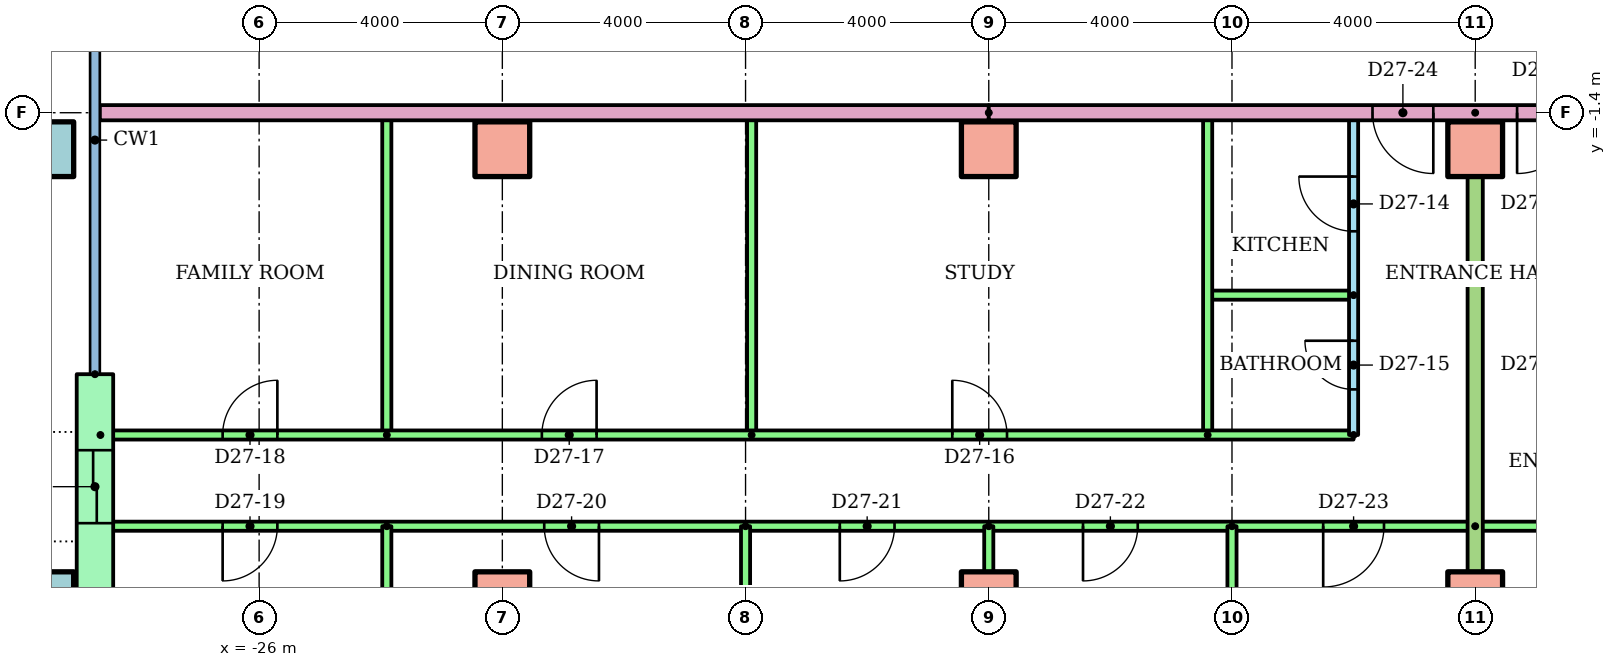
"""IFC4 building model, lengths in metres.
Left out: names, types, materials, properties, quantities, classifications, styles, units other than length and angle.
Written with IfcOpenShell. Run it as: python <this file> out.ifc"""

import sys

from ifc_helpers import new_model, si_unit, direction, frame, frame_2d, origin, origin_2d, place, context, subcontext, project, spatial, rectangle, hollow_rectangle, extrude, element, fill, save


model = new_model("IFC4")
c1 = context("Model", 3, precision=1e-05, world=origin(), true_north=direction((0.0, 1.0)))
c2 = subcontext(c1, "Body", "Model", "MODEL_VIEW")
j1 = project(units=[si_unit("LENGTHUNIT", "METRE"), si_unit("PLANEANGLEUNIT", "RADIAN")], contexts=[c1])
p1 = place(None, origin())
s1 = spatial("IfcSite", under=j1, at=p1, CompositionType="ELEMENT")
p2 = place(p1, origin())
s2 = spatial("IfcBuilding", under=s1, at=p2, CompositionType="ELEMENT")
p3 = place(p2, frame((0.0, 0.0, 103.1)))
s3 = spatial("IfcBuildingStorey", under=s2, at=p3, CompositionType="ELEMENT", Elevation=103.1)
p4 = place(p3, frame((-29.5, -9.4, 0.0)))
e1 = element("IfcColumn", 1, at=p4, inside=s3, PredefinedType="COLUMN", context=c2, shape_type="SweptSolid", body=[
    extrude(hollow_rectangle(XDim=0.9, YDim=0.9, WallThickness=0.045, at=origin_2d()), origin(), (0.0, 0.0, 1.0), 3.2),
])
for number, where in (
    (2, (-22.0, -9.4, 0.0)),
    (3, (-14.0, -9.4, 0.0)),
    (4, (-6.0, -9.4, 0.0)),
):
    element("IfcColumn", number, at=place(p3, frame(where)), inside=s3, PredefinedType="COLUMN", context=c2, shape_type="SweptSolid", body=[
        extrude(rectangle(XDim=0.9, YDim=0.9, at=origin_2d()), origin(), (0.0, 0.0, 1.0), 3.2),
    ])
p5 = place(p3, frame((-29.5, -2.0, 0.0)))
e5 = element("IfcColumn", 5, at=p5, inside=s3, PredefinedType="COLUMN", context=c2, shape_type="SweptSolid", body=[
    extrude(hollow_rectangle(XDim=0.9, YDim=0.9, WallThickness=0.045, at=origin_2d()), origin(), (0.0, 0.0, 1.0), 3.2),
])
for number, where in (
    (6, (-22.0, -2.0, 0.0)),
    (7, (-14.0, -2.0, 0.0)),
    (8, (-6.0, -2.0, 0.0)),
):
    element("IfcColumn", number, at=place(p3, frame(where)), inside=s3, PredefinedType="COLUMN", context=c2, shape_type="SweptSolid", body=[
        extrude(rectangle(XDim=0.9, YDim=0.9, at=origin_2d()), origin(), (0.0, 0.0, 1.0), 3.2),
    ])
p6 = place(p3, frame((-28.7, -5.7, 0.0), z_axis=(0.0, 0.0, 1.0), x_axis=(0.0, -1.0, 0.0)))
e9 = element("IfcWall", 9, at=p6, inside=s3, PredefinedType="STANDARD", context=c2, shape_type="SweptSolid", body=[
    extrude(rectangle(XDim=3.7, YDim=0.6, at=frame_2d((1.85, 0.0))), origin(), (0.0, 0.0, 1.0), 2.8),
])
p7 = place(p6, frame((1.25, 0.0, 0.0)))
e10 = element("IfcOpeningElement", 10, at=p7, cuts=e9, PredefinedType="OPENING", context=c2, shape_type="SweptSolid", body=[
    extrude(rectangle(XDim=1.2, YDim=2.1, at=frame_2d((0.6, 1.05))), frame((0.0, 0.31, 0.0), z_axis=(0.0, -1.0, 0.0), x_axis=(1.0, 0.0, 0.0)), (0.0, 0.0, 1.0), 0.62),
])
p8 = place(p3, frame((-8.0, -6.7, 0.0), z_axis=(0.0, 0.0, 1.0), x_axis=(0.0, 1.0, 0.0)))
e11 = element("IfcWall", 11, at=p8, inside=s3, PredefinedType="PARTITIONING", context=c2, shape_type="SweptSolid", body=[
    extrude(rectangle(XDim=5.3, YDim=0.15, at=frame_2d((2.65, 0.0))), origin(), (0.0, 0.0, 1.0), 2.4),
])
p9 = place(p8, frame((3.35, 0.0, 0.0)))
e12 = element("IfcOpeningElement", 12, at=p9, cuts=e11, PredefinedType="OPENING", context=c2, shape_type="SweptSolid", body=[
    extrude(rectangle(XDim=0.9, YDim=2.1, at=frame_2d((0.45, 1.05))), frame((0.0, 0.085, 0.0), z_axis=(0.0, -1.0, 0.0), x_axis=(1.0, 0.0, 0.0)), (0.0, 0.0, 1.0), 0.17),
])
p10 = place(p8, frame((0.75, 0.0, 0.0)))
e13 = element("IfcOpeningElement", 13, at=p10, cuts=e11, PredefinedType="OPENING", context=c2, shape_type="SweptSolid", body=[
    extrude(rectangle(XDim=0.8, YDim=2.1, at=frame_2d((0.4, 1.05))), frame((0.0, 0.085, 0.0), z_axis=(0.0, -1.0, 0.0), x_axis=(1.0, 0.0, 0.0)), (0.0, 0.0, 1.0), 0.17),
])
p11 = place(p3, frame((-8.0, -4.4, 0.0), z_axis=(0.0, 0.0, 1.0), x_axis=(-1.0, 0.0, 0.0)))
e14 = element("IfcWall", 14, at=p11, inside=s3, PredefinedType="PARTITIONING", context=c2, shape_type="SweptSolid", body=[
    extrude(rectangle(XDim=2.4, YDim=0.15, at=frame_2d((1.2, 0.0))), origin(), (0.0, 0.0, 1.0), 2.4),
])
for number, where, z_axis, x_axis in (
    (15, (-10.4, -6.7, 0.0), (0.0, 0.0, 1.0), (0.0, 1.0, 0.0)),
    (16, (-17.9, -6.7, 0.0), (0.0, 0.0, 1.0), (0.0, 1.0, 0.0)),
    (17, (-23.9, -6.7, 0.0), (0.0, 0.0, 1.0), (0.0, 1.0, 0.0)),
):
    element("IfcWall", number, at=place(p3, frame(where, z_axis=z_axis, x_axis=x_axis)), inside=s3, PredefinedType="PARTITIONING", context=c2, shape_type="SweptSolid", body=[
        extrude(rectangle(XDim=5.3, YDim=0.15, at=frame_2d((2.65, 0.0))), origin(), (0.0, 0.0, 1.0), 2.4),
    ])
p12 = place(p3, frame((-28.61, -6.7, 0.0)))
e18 = element("IfcWall", 18, at=p12, inside=s3, PredefinedType="PARTITIONING", context=c2, shape_type="SweptSolid", body=[
    extrude(rectangle(XDim=20.61, YDim=0.15, at=frame_2d((10.305, 0.0))), origin(), (0.0, 0.0, 1.0), 2.4),
])
p13 = place(p12, frame((14.01, 0.0, 0.0)))
e19 = element("IfcOpeningElement", 19, at=p13, cuts=e18, PredefinedType="OPENING", context=c2, shape_type="SweptSolid", body=[
    extrude(rectangle(XDim=0.9, YDim=2.1, at=frame_2d((0.45, 1.05))), frame((0.0, 0.085, 0.0), z_axis=(0.0, -1.0, 0.0), x_axis=(1.0, 0.0, 0.0)), (0.0, 0.0, 1.0), 0.17),
])
p14 = place(p12, frame((7.26, 0.0, 0.0)))
e20 = element("IfcOpeningElement", 20, at=p14, cuts=e18, PredefinedType="OPENING", context=c2, shape_type="SweptSolid", body=[
    extrude(rectangle(XDim=0.9, YDim=2.1, at=frame_2d((0.45, 1.05))), frame((0.0, 0.085, 0.0), z_axis=(0.0, -1.0, 0.0), x_axis=(1.0, 0.0, 0.0)), (0.0, 0.0, 1.0), 0.17),
])
p15 = place(p12, frame((2.01, 0.0, 0.0)))
e21 = element("IfcOpeningElement", 21, at=p15, cuts=e18, PredefinedType="OPENING", context=c2, shape_type="SweptSolid", body=[
    extrude(rectangle(XDim=0.9, YDim=2.1, at=frame_2d((0.45, 1.05))), frame((0.0, 0.085, 0.0), z_axis=(0.0, -1.0, 0.0), x_axis=(1.0, 0.0, 0.0)), (0.0, 0.0, 1.0), 0.17),
])
p16 = place(p3, frame((-6.0, -8.2, 0.0), z_axis=(0.0, 0.0, 1.0), x_axis=(-1.0, 0.0, 0.0)))
e22 = element("IfcWall", 22, at=p16, inside=s3, PredefinedType="PARTITIONING", context=c2, shape_type="SweptSolid", body=[
    extrude(rectangle(XDim=22.61, YDim=0.15, at=frame_2d((11.305, 0.0))), origin(), (0.0, 0.0, 1.0), 2.4),
])
p17 = place(p16, frame((19.7, 0.0, 0.0)))
e23 = element("IfcOpeningElement", 23, at=p17, cuts=e22, PredefinedType="OPENING", context=c2, shape_type="SweptSolid", body=[
    extrude(rectangle(XDim=0.9, YDim=2.1, at=frame_2d((0.45, 1.05))), frame((0.0, 0.085, 0.0), z_axis=(0.0, -1.0, 0.0), x_axis=(1.0, 0.0, 0.0)), (0.0, 0.0, 1.0), 0.17),
])
p18 = place(p16, frame((14.411, 0.0, 0.0)))
e24 = element("IfcOpeningElement", 24, at=p18, cuts=e22, PredefinedType="OPENING", context=c2, shape_type="SweptSolid", body=[
    extrude(rectangle(XDim=0.9, YDim=2.1, at=frame_2d((0.45, 1.05))), frame((0.0, 0.085, 0.0), z_axis=(0.0, -1.0, 0.0), x_axis=(1.0, 0.0, 0.0)), (0.0, 0.0, 1.0), 0.17),
])
p19 = place(p16, frame((9.55, 0.0, 0.0)))
e25 = element("IfcOpeningElement", 25, at=p19, cuts=e22, PredefinedType="OPENING", context=c2, shape_type="SweptSolid", body=[
    extrude(rectangle(XDim=0.9, YDim=2.1, at=frame_2d((0.45, 1.05))), frame((0.0, 0.085, 0.0), z_axis=(0.0, -1.0, 0.0), x_axis=(1.0, 0.0, 0.0)), (0.0, 0.0, 1.0), 0.17),
])
p20 = place(p16, frame((5.55, 0.0, 0.0)))
e26 = element("IfcOpeningElement", 26, at=p20, cuts=e22, PredefinedType="OPENING", context=c2, shape_type="SweptSolid", body=[
    extrude(rectangle(XDim=0.9, YDim=2.1, at=frame_2d((0.45, 1.05))), frame((0.0, 0.085, 0.0), z_axis=(0.0, -1.0, 0.0), x_axis=(1.0, 0.0, 0.0)), (0.0, 0.0, 1.0), 0.17),
])
p21 = place(p16, frame((1.5, 0.0, 0.0)))
e27 = element("IfcOpeningElement", 27, at=p21, cuts=e22, PredefinedType="OPENING", context=c2, shape_type="SweptSolid", body=[
    extrude(rectangle(XDim=1.0, YDim=2.1, at=frame_2d((0.5, 1.05))), frame((0.0, 0.085, 0.0), z_axis=(0.0, -1.0, 0.0), x_axis=(1.0, 0.0, 0.0)), (0.0, 0.0, 1.0), 0.17),
])
p22 = place(p3, frame((-23.9, -8.2, 0.0), z_axis=(0.0, 0.0, 1.0), x_axis=(0.0, -1.0, 0.0)))
e28 = element("IfcWall", 28, at=p22, inside=s3, PredefinedType="PARTITIONING", context=c2, shape_type="SweptSolid", body=[
    extrude(rectangle(XDim=6.22, YDim=0.15, at=frame_2d((3.11, 0.0))), origin(), (0.0, 0.0, 1.0), 2.4),
])
p23 = place(p3, frame((-18.0, -8.2, 0.0), z_axis=(0.0, 0.0, 1.0), x_axis=(0.0, -1.0, 0.0)))
e29 = element("IfcWall", 29, at=p23, inside=s3, PredefinedType="PARTITIONING", context=c2, shape_type="SweptSolid", body=[
    extrude(rectangle(XDim=8.021, YDim=0.15, at=frame_2d((4.01, 0.0))), origin(), (0.0, 0.0, 1.0), 2.4),
])
p24 = place(p3, frame((-14.0, -8.2, 0.0), z_axis=(0.0, 0.0, 1.0), x_axis=(0.0, -1.0, 0.0)))
e30 = element("IfcWall", 30, at=p24, inside=s3, PredefinedType="PARTITIONING", context=c2, shape_type="SweptSolid", body=[
    extrude(rectangle(XDim=8.01, YDim=0.15, at=frame_2d((4.005, 0.0))), origin(), (0.0, 0.0, 1.0), 2.4),
])
p25 = place(p3, frame((-10.0, -8.2, 0.0), z_axis=(0.0, 0.0, 1.0), x_axis=(0.0, -1.0, 0.0)))
e31 = element("IfcWall", 31, at=p25, inside=s3, PredefinedType="PARTITIONING", context=c2, shape_type="SweptSolid", body=[
    extrude(rectangle(XDim=8.021, YDim=0.15, at=frame_2d((4.01, 0.0))), origin(), (0.0, 0.0, 1.0), 2.4),
])
p26 = place(p3, frame((18.0, -8.2, 0.0), z_axis=(0.0, 0.0, 1.0), x_axis=(-1.0, 0.0, 0.0)))
e32 = element("IfcWall", 32, at=p26, inside=s3, PredefinedType="PARTITIONING", context=c2, shape_type="SweptSolid", body=[
    extrude(rectangle(XDim=24.0, YDim=0.15, at=frame_2d((12.0, 0.0))), origin(), (0.0, 0.0, 1.0), 2.4),
])
p27 = place(p26, frame((21.55, 0.0, 0.0)))
e33 = element("IfcOpeningElement", 33, at=p27, cuts=e32, PredefinedType="OPENING", context=c2, shape_type="SweptSolid", body=[
    extrude(rectangle(XDim=0.9, YDim=2.1, at=frame_2d((0.45, 1.05))), frame((0.0, 0.085, 0.0), z_axis=(0.0, -1.0, 0.0), x_axis=(1.0, 0.0, 0.0)), (0.0, 0.0, 1.0), 0.17),
])
p28 = place(p26, frame((17.55, 0.0, 0.0)))
e34 = element("IfcOpeningElement", 34, at=p28, cuts=e32, PredefinedType="OPENING", context=c2, shape_type="SweptSolid", body=[
    extrude(rectangle(XDim=0.9, YDim=2.1, at=frame_2d((0.45, 1.05))), frame((0.0, 0.085, 0.0), z_axis=(0.0, -1.0, 0.0), x_axis=(1.0, 0.0, 0.0)), (0.0, 0.0, 1.0), 0.17),
])
p29 = place(p26, frame((13.55, 0.0, 0.0)))
e35 = element("IfcOpeningElement", 35, at=p29, cuts=e32, PredefinedType="OPENING", context=c2, shape_type="SweptSolid", body=[
    extrude(rectangle(XDim=0.9, YDim=2.1, at=frame_2d((0.45, 1.05))), frame((0.0, 0.085, 0.0), z_axis=(0.0, -1.0, 0.0), x_axis=(1.0, 0.0, 0.0)), (0.0, 0.0, 1.0), 0.17),
])
p30 = place(p26, frame((9.55, 0.0, 0.0)))
e36 = element("IfcOpeningElement", 36, at=p30, cuts=e32, PredefinedType="OPENING", context=c2, shape_type="SweptSolid", body=[
    extrude(rectangle(XDim=0.9, YDim=2.1, at=frame_2d((0.45, 1.05))), frame((0.0, 0.085, 0.0), z_axis=(0.0, -1.0, 0.0), x_axis=(1.0, 0.0, 0.0)), (0.0, 0.0, 1.0), 0.17),
])
p31 = place(p26, frame((3.5, 0.0, 0.0)))
e37 = element("IfcOpeningElement", 37, at=p31, cuts=e32, PredefinedType="OPENING", context=c2, shape_type="SweptSolid", body=[
    extrude(rectangle(XDim=1.0, YDim=2.1, at=frame_2d((0.5, 1.05))), frame((0.0, 0.085, 0.0), z_axis=(0.0, -1.0, 0.0), x_axis=(1.0, 0.0, 0.0)), (0.0, 0.0, 1.0), 0.17),
])
p32 = place(p3, frame((-6.0, -1.4, 0.0), z_axis=(0.0, 0.0, 1.0), x_axis=(0.0, -1.0, 0.0)))
e38 = element("IfcWall", 38, at=p32, inside=s3, PredefinedType="PARTITIONING", context=c2, shape_type="SweptSolid", body=[
    extrude(rectangle(XDim=14.81, YDim=0.25, at=frame_2d((7.405, 0.0))), origin(), (0.0, 0.0, 1.0), 2.4),
])
p33 = place(p3, frame((-14.0, -1.4, 0.0), z_axis=(0.0, 0.0, 1.0), x_axis=(-1.0, 0.0, 0.0)))
e39 = element("IfcWall", 39, at=p33, inside=s3, PredefinedType="PARTITIONING", context=c2, shape_type="SweptSolid", body=[
    extrude(rectangle(XDim=14.62, YDim=0.25, at=frame_2d((7.31, 0.0))), origin(), (0.0, 0.0, 1.0), 2.4),
])
p34 = place(p3, frame((14.0, -1.4, 0.0), z_axis=(0.0, 0.0, 1.0), x_axis=(-1.0, 0.0, 0.0)))
e40 = element("IfcWall", 40, at=p34, inside=s3, PredefinedType="PARTITIONING", context=c2, shape_type="SweptSolid", body=[
    extrude(rectangle(XDim=28.0, YDim=0.25, at=frame_2d((14.0, 0.0))), origin(), (0.0, 0.0, 1.0), 2.4),
])
p35 = place(p34, frame((20.689, 0.0, 0.0)))
e41 = element("IfcOpeningElement", 41, at=p35, cuts=e40, PredefinedType="OPENING", context=c2, shape_type="SweptSolid", body=[
    extrude(rectangle(XDim=1.0, YDim=2.1, at=frame_2d((0.5, 1.05))), frame((0.0, 0.135, 0.0), z_axis=(0.0, -1.0, 0.0), x_axis=(1.0, 0.0, 0.0)), (0.0, 0.0, 1.0), 0.27),
])
p36 = place(p34, frame((18.311, 0.0, 0.0)))
e42 = element("IfcOpeningElement", 42, at=p36, cuts=e40, PredefinedType="OPENING", context=c2, shape_type="SweptSolid", body=[
    extrude(rectangle(XDim=1.0, YDim=2.1, at=frame_2d((0.5, 1.05))), frame((0.0, 0.135, 0.0), z_axis=(0.0, -1.0, 0.0), x_axis=(1.0, 0.0, 0.0)), (0.0, 0.0, 1.0), 0.27),
])
p37 = place(p9, origin())
e43 = element("IfcDoor", 43, at=p37, inside=s3, OperationType="SINGLE_SWING_RIGHT", PredefinedType="DOOR", context=c2, shape_type="SweptSolid", body=[
    extrude(rectangle(XDim=0.9, YDim=2.1, at=frame_2d((0.45, 1.05))), frame((0.0, 0.025, 0.0), z_axis=(0.0, -1.0, 0.0), x_axis=(1.0, 0.0, 0.0)), (0.0, 0.0, 1.0), 0.05),
])
fill(e12, e43)
p38 = place(p10, origin())
e44 = element("IfcDoor", 44, at=p38, inside=s3, OperationType="SINGLE_SWING_RIGHT", PredefinedType="DOOR", context=c2, shape_type="SweptSolid", body=[
    extrude(rectangle(XDim=0.8, YDim=2.1, at=frame_2d((0.4, 1.05))), frame((0.0, 0.025, 0.0), z_axis=(0.0, -1.0, 0.0), x_axis=(1.0, 0.0, 0.0)), (0.0, 0.0, 1.0), 0.05),
])
fill(e13, e44)
p39 = place(p13, origin())
e45 = element("IfcDoor", 45, at=p39, inside=s3, OperationType="SINGLE_SWING_LEFT", PredefinedType="DOOR", context=c2, shape_type="SweptSolid", body=[
    extrude(rectangle(XDim=0.9, YDim=2.1, at=frame_2d((0.45, 1.05))), frame((0.0, 0.025, 0.0), z_axis=(0.0, -1.0, 0.0), x_axis=(1.0, 0.0, 0.0)), (0.0, 0.0, 1.0), 0.05),
])
fill(e19, e45)
p40 = place(p14, origin())
e46 = element("IfcDoor", 46, at=p40, inside=s3, OperationType="SINGLE_SWING_RIGHT", PredefinedType="DOOR", context=c2, shape_type="SweptSolid", body=[
    extrude(rectangle(XDim=0.9, YDim=2.1, at=frame_2d((0.45, 1.05))), frame((0.0, 0.025, 0.0), z_axis=(0.0, -1.0, 0.0), x_axis=(1.0, 0.0, 0.0)), (0.0, 0.0, 1.0), 0.05),
])
fill(e20, e46)
p41 = place(p15, origin())
e47 = element("IfcDoor", 47, at=p41, inside=s3, OperationType="SINGLE_SWING_RIGHT", PredefinedType="DOOR", context=c2, shape_type="SweptSolid", body=[
    extrude(rectangle(XDim=0.9, YDim=2.1, at=frame_2d((0.45, 1.05))), frame((0.0, 0.025, 0.0), z_axis=(0.0, -1.0, 0.0), x_axis=(1.0, 0.0, 0.0)), (0.0, 0.0, 1.0), 0.05),
])
fill(e21, e47)
p42 = place(p17, origin())
e48 = element("IfcDoor", 48, at=p42, inside=s3, OperationType="SINGLE_SWING_RIGHT", PredefinedType="DOOR", context=c2, shape_type="SweptSolid", body=[
    extrude(rectangle(XDim=0.9, YDim=2.1, at=frame_2d((0.45, 1.05))), frame((0.0, 0.025, 0.0), z_axis=(0.0, -1.0, 0.0), x_axis=(1.0, 0.0, 0.0)), (0.0, 0.0, 1.0), 0.05),
])
fill(e23, e48)
p43 = place(p18, origin())
e49 = element("IfcDoor", 49, at=p43, inside=s3, OperationType="SINGLE_SWING_LEFT", PredefinedType="DOOR", context=c2, shape_type="SweptSolid", body=[
    extrude(rectangle(XDim=0.9, YDim=2.1, at=frame_2d((0.45, 1.05))), frame((0.0, 0.025, 0.0), z_axis=(0.0, -1.0, 0.0), x_axis=(1.0, 0.0, 0.0)), (0.0, 0.0, 1.0), 0.05),
])
fill(e24, e49)
p44 = place(p19, origin())
e50 = element("IfcDoor", 50, at=p44, inside=s3, OperationType="SINGLE_SWING_RIGHT", PredefinedType="DOOR", context=c2, shape_type="SweptSolid", body=[
    extrude(rectangle(XDim=0.9, YDim=2.1, at=frame_2d((0.45, 1.05))), frame((0.0, 0.025, 0.0), z_axis=(0.0, -1.0, 0.0), x_axis=(1.0, 0.0, 0.0)), (0.0, 0.0, 1.0), 0.05),
])
fill(e25, e50)
p45 = place(p20, origin())
e51 = element("IfcDoor", 51, at=p45, inside=s3, OperationType="SINGLE_SWING_RIGHT", PredefinedType="DOOR", context=c2, shape_type="SweptSolid", body=[
    extrude(rectangle(XDim=0.9, YDim=2.1, at=frame_2d((0.45, 1.05))), frame((0.0, 0.025, 0.0), z_axis=(0.0, -1.0, 0.0), x_axis=(1.0, 0.0, 0.0)), (0.0, 0.0, 1.0), 0.05),
])
fill(e26, e51)
p46 = place(p21, origin())
e52 = element("IfcDoor", 52, at=p46, inside=s3, OperationType="SINGLE_SWING_RIGHT", PredefinedType="DOOR", context=c2, shape_type="SweptSolid", body=[
    extrude(rectangle(XDim=1.0, YDim=2.1, at=frame_2d((0.5, 1.05))), frame((0.0, 0.025, 0.0), z_axis=(0.0, -1.0, 0.0), x_axis=(1.0, 0.0, 0.0)), (0.0, 0.0, 1.0), 0.05),
])
fill(e27, e52)
p47 = place(p35, origin())
e53 = element("IfcDoor", 53, at=p47, inside=s3, OperationType="SINGLE_SWING_LEFT", PredefinedType="DOOR", context=c2, shape_type="SweptSolid", body=[
    extrude(rectangle(XDim=1.0, YDim=2.1, at=frame_2d((0.5, 1.05))), frame((0.0, 0.025, 0.0), z_axis=(0.0, -1.0, 0.0), x_axis=(1.0, 0.0, 0.0)), (0.0, 0.0, 1.0), 0.05),
])
fill(e41, e53)
p48 = place(p36, origin())
e54 = element("IfcDoor", 54, at=p48, inside=s3, OperationType="SINGLE_SWING_RIGHT", PredefinedType="DOOR", context=c2, shape_type="SweptSolid", body=[
    extrude(rectangle(XDim=1.0, YDim=2.1, at=frame_2d((0.5, 1.05))), frame((0.0, 0.025, 0.0), z_axis=(0.0, -1.0, 0.0), x_axis=(1.0, 0.0, 0.0)), (0.0, 0.0, 1.0), 0.05),
])
fill(e42, e54)
p49 = place(p7, origin())
e55 = element("IfcDoor", 55, at=p49, inside=s3, OperationType="SLIDING_TO_LEFT", PredefinedType="DOOR", context=c2, shape_type="SweptSolid", body=[
    extrude(rectangle(XDim=1.2, YDim=2.1, at=frame_2d((0.6, 1.05))), frame((0.0, 0.025, 0.0), z_axis=(0.0, -1.0, 0.0), x_axis=(1.0, 0.0, 0.0)), (0.0, 0.0, 1.0), 0.05),
])
fill(e10, e55)
save(model, sys.argv[1])
